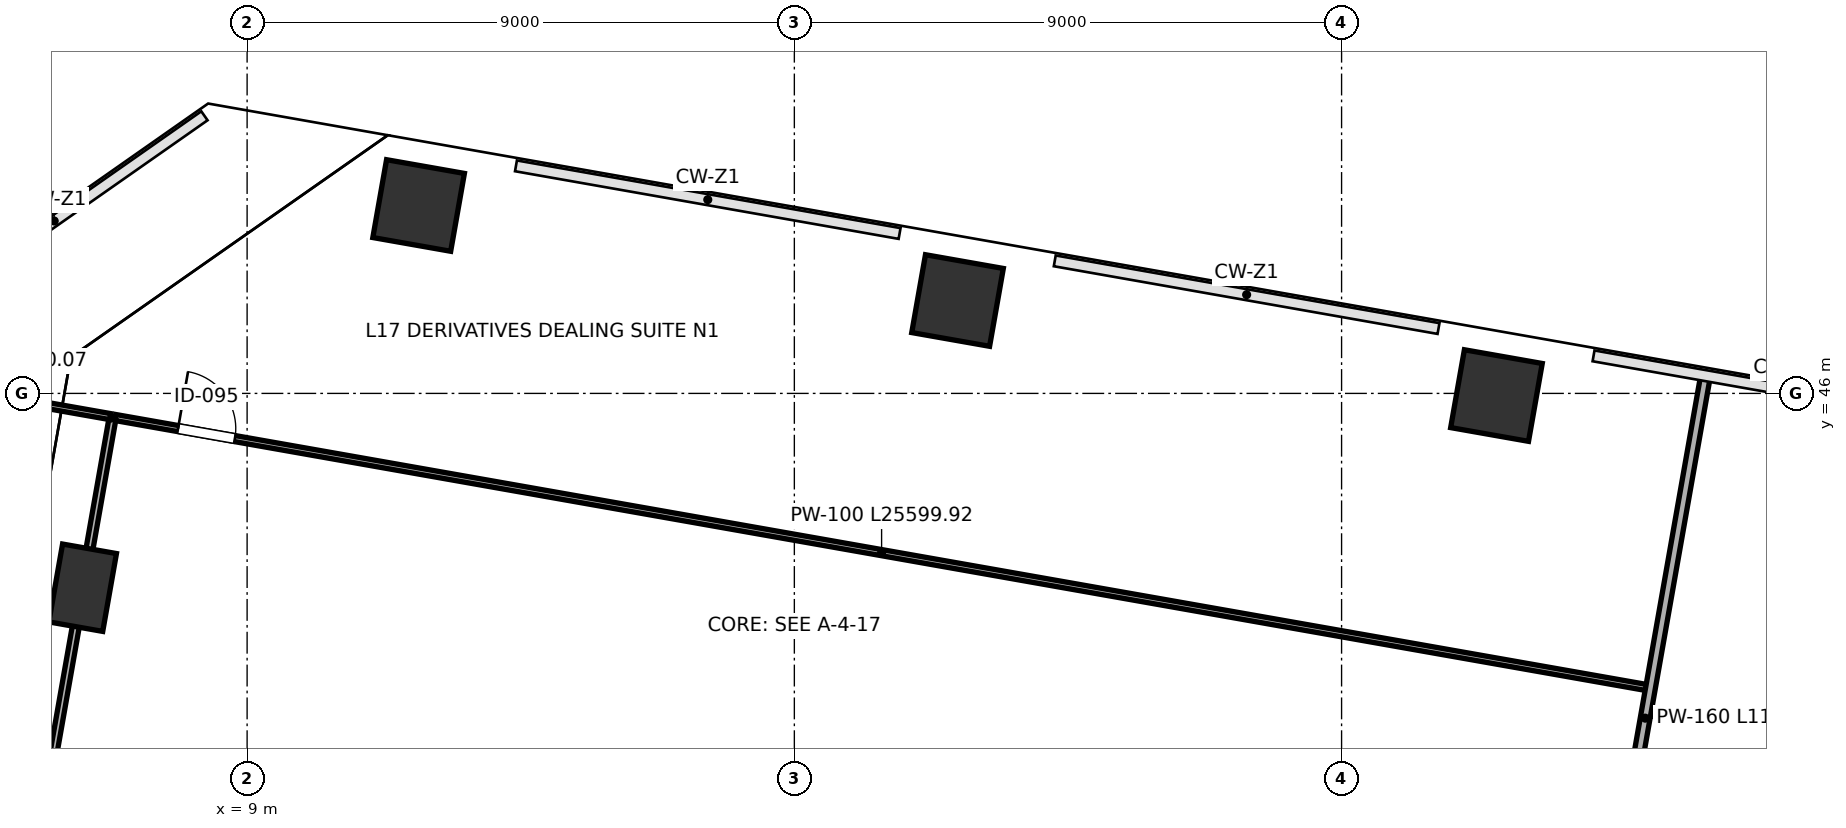
"""IFC4 building model, lengths in metres.
Left out: names, types, materials, properties, quantities, classifications, styles, units other than length and angle.
Written with IfcOpenShell. Run it as: python <this file> out.ifc"""

import sys

from ifc_helpers import new_model, si_unit, direction, frame, frame_2d, origin, origin_2d, place, context, subcontext, project, spatial, rectangle, extrude, clip, halfspace, source, transform, mapped, element, fill, save


model = new_model("IFC4")
c1 = context("Model", 3, precision=1e-05, world=origin(), true_north=direction((0.0, 1.0)))
c2 = subcontext(c1, "Body", "Model", "MODEL_VIEW")
j1 = project(units=[si_unit("LENGTHUNIT", "METRE"), si_unit("PLANEANGLEUNIT", "RADIAN")], contexts=[c1])
p1 = place(None, origin())
s1 = spatial("IfcSite", under=j1, at=p1, CompositionType="ELEMENT")
p2 = place(p1, origin())
s2 = spatial("IfcBuilding", under=s1, at=p2, CompositionType="ELEMENT")
p3 = place(p2, frame((0.0, 0.0, 79.0)))
s3 = spatial("IfcBuildingStorey", under=s2, at=p3, CompositionType="ELEMENT", Elevation=79.0)
p4 = place(p3, frame((11.821, 49.09, 0.0), z_axis=(0.088825711791, 0.049097024291, 0.994836406215), x_axis=(0.325212970224, -0.94547655982, 0.017623814278)))
e1 = element("IfcColumn", 1, at=p4, inside=s3, PredefinedType="COLUMN", context=c2, shape_type="Clipping", body=[
    clip(clip(extrude(rectangle(XDim=1.3, YDim=1.3, at=origin_2d()), origin(), (0.0, 0.0, 1.0), 4.222), halfspace(frame((0.0, 0.0, 0.078), z_axis=(0.0, 0.0, -1.0), x_axis=(1.0, 0.0, 0.0)), False)), halfspace(frame((0.0, 0.0, 4.144), z_axis=(0.0, 0.0, 1.0), x_axis=(1.0, 0.0, 0.0)), False)),
])
p5 = place(p3, frame((20.684, 47.528, 0.0), z_axis=(0.080479369688, 0.003360549634, 0.996750609611), x_axis=(-0.131846749802, -0.991171423482, 0.013987274199)))
e2 = element("IfcColumn", 2, at=p5, inside=s3, PredefinedType="COLUMN", context=c2, shape_type="Clipping", body=[
    clip(clip(extrude(rectangle(XDim=1.3, YDim=1.3, at=origin_2d()), origin(), (0.0, 0.0, 1.0), 4.214), halfspace(frame((0.0, 0.0, 0.062), z_axis=(0.0, 0.0, -1.0), x_axis=(1.0, 0.0, 0.0)), False)), halfspace(frame((0.0, 0.0, 4.152), z_axis=(0.0, 0.0, 1.0), x_axis=(1.0, 0.0, 0.0)), False)),
])
p6 = place(p3, frame((29.547, 45.965, 0.0), z_axis=(0.071829090236, -0.042460260599, 0.996512773659), x_axis=(-0.650101403004, -0.759709304288, 0.014489264645)))
e3 = element("IfcColumn", 3, at=p6, inside=s3, PredefinedType="COLUMN", context=c2, shape_type="Clipping", body=[
    clip(clip(extrude(rectangle(XDim=1.3, YDim=1.3, at=origin_2d()), origin(), (0.0, 0.0, 1.0), 4.215), halfspace(frame((0.0, 0.0, 0.064), z_axis=(0.0, 0.0, -1.0), x_axis=(1.0, 0.0, 0.0)), False)), halfspace(frame((0.0, 0.0, 4.151), z_axis=(0.0, 0.0, 1.0), x_axis=(1.0, 0.0, 0.0)), False)),
])
p7 = place(p3, frame((6.295, 42.804, 0.0), z_axis=(0.056701351042, 0.077993286943, 0.995340144866), x_axis=(0.69491742365, -0.718894571841, 0.016744219477)))
e4 = element("IfcColumn", 4, at=p7, inside=s3, PredefinedType="PILASTER", context=c2, shape_type="Clipping", body=[
    clip(clip(extrude(rectangle(XDim=0.9, YDim=1.3, at=origin_2d()), origin(), (0.0, 0.0, 1.0), 4.22), halfspace(frame((0.0, 0.0, 0.07), z_axis=(0.0, 0.0, -1.0), x_axis=(1.0, 0.0, 0.0)), False)), halfspace(frame((0.0, 0.0, 4.149), z_axis=(0.0, 0.0, 1.0), x_axis=(1.0, 0.0, 0.0)), False)),
])
p8 = place(p3, frame((6.83, 45.604, 0.0), z_axis=(0.0, 0.0, 1.0), x_axis=(0.984806496121, -0.173655305701, 0.0)))
e5 = element("IfcWall", 5, at=p8, inside=s3, PredefinedType="PARTITIONING", context=c2, shape_type="SweptSolid", body=[
    extrude(rectangle(XDim=25.6, YDim=0.1, at=frame_2d((12.8, 0.0))), origin(), (0.0, 0.0, 1.0), 3.96),
])
p9 = place(p8, frame((1.05, 0.0, 0.0)))
e6 = element("IfcOpeningElement", 6, at=p9, cuts=e5, PredefinedType="OPENING", context=c2, shape_type="SweptSolid", body=[
    extrude(rectangle(XDim=0.95, YDim=2.15, at=frame_2d((0.475, 1.075))), frame((0.0, 0.06, 0.0), z_axis=(0.0, -1.0, 0.0), x_axis=(1.0, 0.0, 0.0)), (0.0, 0.0, 1.0), 0.12),
])
p10 = place(p3, frame((2.607, 21.887, 0.0), z_axis=(0.0, 0.0, 1.0), x_axis=(0.173659666579, 0.984805727138, 0.0)))
e7 = element("IfcWall", 7, at=p10, inside=s3, PredefinedType="PARTITIONING", context=c2, shape_type="SweptSolid", body=[
    extrude(rectangle(XDim=24.05, YDim=0.115, at=frame_2d((12.025, 0.0))), origin(), (0.0, 0.0, 1.0), 2.795),
])
p11 = place(p10, frame((2.2, 0.0, 0.0)))
e8 = element("IfcOpeningElement", 8, at=p11, cuts=e7, PredefinedType="OPENING", context=c2, shape_type="SweptSolid", body=[
    extrude(rectangle(XDim=0.95, YDim=2.15, at=frame_2d((0.475, 1.075))), frame((0.0, 0.067, 0.0), z_axis=(0.0, -1.0, 0.0), x_axis=(1.0, 0.0, 0.0)), (0.0, 0.0, 1.0), 0.135),
])
p12 = place(p3, frame((3.176, 46.249, 0.0), z_axis=(0.0, 0.0, 1.0), x_axis=(0.984795743306, -0.173716274326, 0.0)))
e9 = element("IfcWall", 9, at=p12, inside=s3, PredefinedType="PARTITIONING", context=c2, shape_type="SweptSolid", body=[
    extrude(rectangle(XDim=3.63, YDim=0.1, at=frame_2d((1.815, 0.0))), origin(), (0.0, 0.0, 1.0), 3.96),
])
p13 = place(p3, frame((31.009, 35.076, 0.0), z_axis=(0.0, 0.0, 1.0), x_axis=(0.173653918008, 0.984806740818, 0.0)))
e10 = element("IfcWall", 10, at=p13, inside=s3, PredefinedType="PARTITIONING", context=c2, shape_type="SweptSolid", body=[
    extrude(rectangle(XDim=11.34, YDim=0.16, at=frame_2d((5.67, 0.0))), origin(), (0.0, 0.0, 1.0), 3.095),
])
m1 = source(origin(), c2, "Body", "SweptSolid", [
    extrude(rectangle(XDim=0.95, YDim=2.15, at=frame_2d((0.475, 1.075))), frame((0.0, 0.025, 0.0), z_axis=(0.0, -1.0, 0.0), x_axis=(1.0, 0.0, 0.0)), (0.0, 0.0, 1.0), 0.05),
])
p14 = place(p9, origin())
e11 = element("IfcDoor", 11, at=p14, inside=s3, OperationType="SINGLE_SWING_LEFT", PredefinedType="DOOR", context=c2, shape_type="MappedRepresentation", body=[
    mapped(m1, transform((0.0, 0.0, 0.0), scale=1.0)),
])
fill(e6, e11)
save(model, sys.argv[1])
